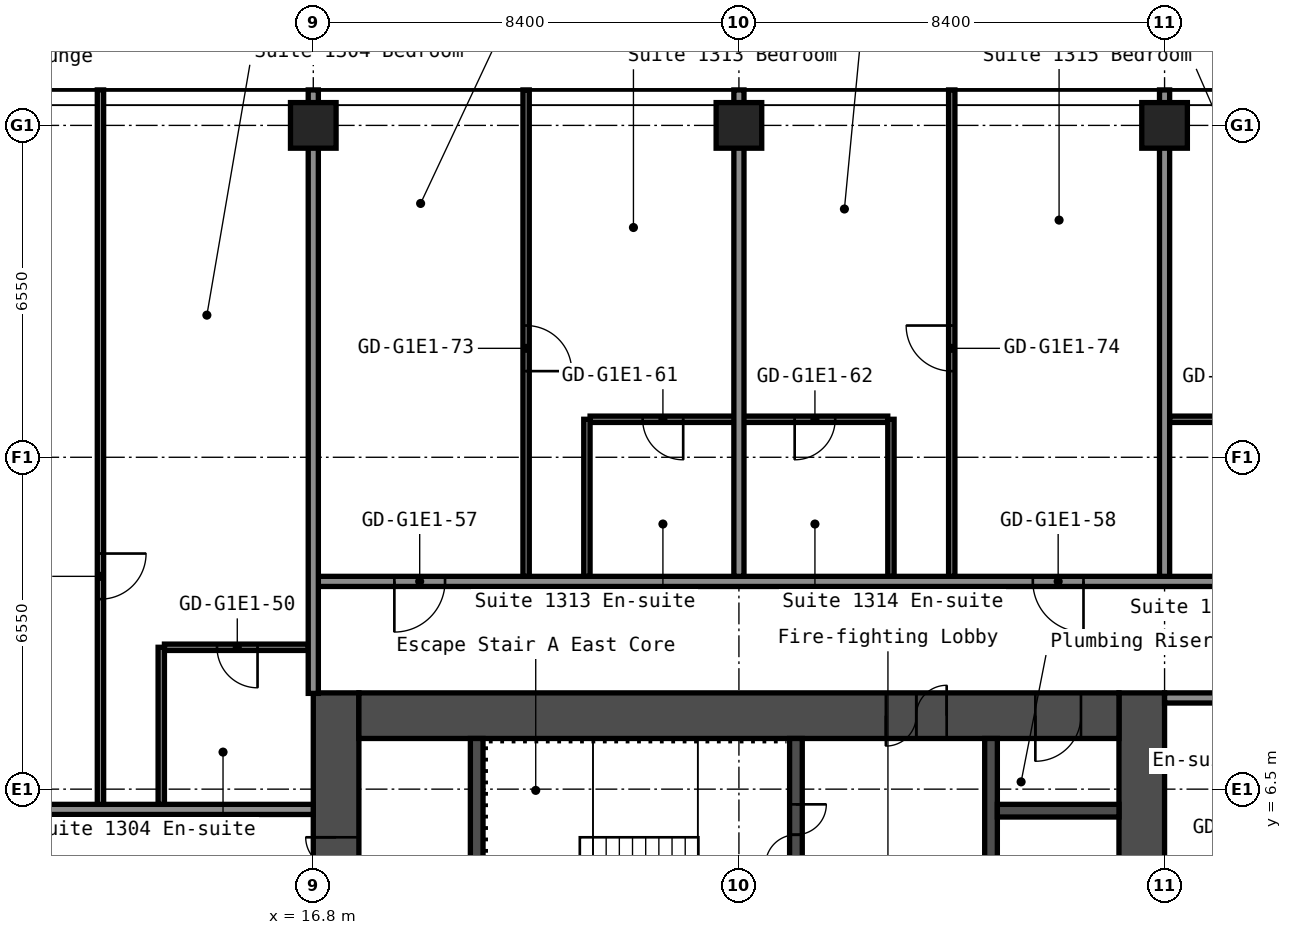
"""IFC4 building model, lengths in metres.
Left out: names, types, materials, properties, quantities, classifications, styles, units other than length and angle.
Written with IfcOpenShell. Run it as: python <this file> out.ifc"""

import sys

from ifc_helpers import new_model, si_unit, direction, frame, frame_2d, origin, origin_2d, place, context, subcontext, project, spatial, rectangle, hollow_rectangle, extrude, element, fill, save


model = new_model("IFC4")
c1 = context("Model", 3, precision=1e-05, world=origin(), true_north=direction((0.0, 1.0)))
c2 = subcontext(c1, "Body", "Model", "MODEL_VIEW")
j1 = project(units=[si_unit("LENGTHUNIT", "METRE"), si_unit("PLANEANGLEUNIT", "RADIAN")], contexts=[c1])
p1 = place(None, origin())
s1 = spatial("IfcSite", under=j1, at=p1, CompositionType="ELEMENT")
p2 = place(p1, origin())
s2 = spatial("IfcBuilding", under=s1, at=p2, CompositionType="ELEMENT")
p3 = place(p2, frame((0.0, 0.0, 48.6)))
s3 = spatial("IfcBuildingStorey", under=s2, at=p3, CompositionType="ELEMENT", Elevation=48.6)
for number, where, z_axis, x_axis in (
    (1, (16.8, 19.6, 0.0), (0.0, 0.0, 1.0), (1.0, 0.0, 0.0)),
    (2, (25.2, 19.6, 0.0), (0.0, 0.0, 1.0), (1.0, 0.0, 0.0)),
    (3, (33.6, 19.6, 0.0), (0.0, 0.0, 1.0), (1.0, 0.0, 0.0)),
):
    element("IfcColumn", number, at=place(p3, frame(where, z_axis=z_axis, x_axis=x_axis)), inside=s3, PredefinedType="COLUMN", context=c2, shape_type="SweptSolid", body=[
        extrude(hollow_rectangle(XDim=0.9, YDim=0.9, WallThickness=0.036, at=origin_2d()), origin(), (0.0, 0.0, 1.0), 2.8),
    ])
p4 = place(p3, frame((17.25, -8.4, 0.0), z_axis=(0.0, 0.0, 1.0), x_axis=(0.0, 1.0, 0.0)))
e4 = element("IfcWall", 4, at=p4, inside=s3, PredefinedType="SHEAR", context=c2, shape_type="SweptSolid", body=[
    extrude(rectangle(XDim=16.8, YDim=0.9, at=frame_2d((8.4, 0.0))), origin(), (0.0, 0.0, 1.0), 2.8),
])
p5 = place(p4, frame((12.75, 0.0, 0.0)))
e5 = element("IfcOpeningElement", 5, at=p5, cuts=e4, PredefinedType="OPENING", context=c2, shape_type="SweptSolid", body=[
    extrude(rectangle(XDim=1.2, YDim=2.1, at=frame_2d((0.6, 1.05))), frame((0.0, 0.46, 0.0), z_axis=(0.0, -1.0, 0.0), x_axis=(1.0, 0.0, 0.0)), (0.0, 0.0, 1.0), 0.92),
])
p6 = place(p4, frame((2.85, 0.0, 0.0)))
e6 = element("IfcOpeningElement", 6, at=p6, cuts=e4, PredefinedType="OPENING", context=c2, shape_type="SweptSolid", body=[
    extrude(rectangle(XDim=1.2, YDim=2.1, at=frame_2d((0.6, 1.05))), frame((0.0, 0.46, 0.0), z_axis=(0.0, -1.0, 0.0), x_axis=(1.0, 0.0, 0.0)), (0.0, 0.0, 1.0), 0.92),
])
p7 = place(p3, frame((33.15, -8.4, 0.0), z_axis=(0.0, 0.0, 1.0), x_axis=(0.0, 1.0, 0.0)))
e7 = element("IfcWall", 7, at=p7, inside=s3, PredefinedType="SHEAR", context=c2, shape_type="SweptSolid", body=[
    extrude(rectangle(XDim=16.8, YDim=0.9, at=frame_2d((8.4, 0.0))), origin(), (0.0, 0.0, 1.0), 2.8),
])
p8 = place(p3, frame((17.7, 7.95, 0.0), z_axis=(0.0, 0.0, 1.0), x_axis=(1.0, 0.0, 0.0)))
e8 = element("IfcWall", 8, at=p8, inside=s3, PredefinedType="SHEAR", context=c2, shape_type="SweptSolid", body=[
    extrude(rectangle(XDim=15.0, YDim=0.9, at=frame_2d((7.5, 0.0))), origin(), (0.0, 0.0, 1.0), 2.8),
])
p9 = place(p8, frame((10.4, 0.0, 0.0)))
e9 = element("IfcOpeningElement", 9, at=p9, cuts=e8, PredefinedType="OPENING", context=c2, shape_type="SweptSolid", body=[
    extrude(rectangle(XDim=1.2, YDim=2.1, at=frame_2d((0.6, 1.05))), frame((0.0, 0.46, 0.0), z_axis=(0.0, -1.0, 0.0), x_axis=(1.0, 0.0, 0.0)), (0.0, 0.0, 1.0), 0.92),
])
p10 = place(p8, frame((13.35, 0.0, 0.0)))
e10 = element("IfcOpeningElement", 10, at=p10, cuts=e8, PredefinedType="OPENING", context=c2, shape_type="SweptSolid", body=[
    extrude(rectangle(XDim=0.9, YDim=2.1, at=frame_2d((0.45, 1.05))), frame((0.0, 0.46, 0.0), z_axis=(0.0, -1.0, 0.0), x_axis=(1.0, 0.0, 0.0)), (0.0, 0.0, 1.0), 0.92),
])
p11 = place(p3, frame((20.025, 1.2, 0.0), z_axis=(0.0, 0.0, 1.0), x_axis=(0.0, 1.0, 0.0)))
e11 = element("IfcWall", 11, at=p11, inside=s3, PredefinedType="SHEAR", context=c2, shape_type="SweptSolid", body=[
    extrude(rectangle(XDim=6.3, YDim=0.25, at=frame_2d((3.15, 0.0))), origin(), (0.0, 0.0, 1.0), 2.8),
])
p12 = place(p3, frame((26.325, 3.75, 0.0), z_axis=(0.0, 0.0, 1.0), x_axis=(0.0, 1.0, 0.0)))
e12 = element("IfcWall", 12, at=p12, inside=s3, PredefinedType="SHEAR", context=c2, shape_type="SweptSolid", body=[
    extrude(rectangle(XDim=3.75, YDim=0.25, at=frame_2d((1.875, 0.0))), origin(), (0.0, 0.0, 1.0), 2.8),
])
p13 = place(p12, frame((1.25, 0.0, 0.0)))
e13 = element("IfcOpeningElement", 13, at=p13, cuts=e12, PredefinedType="OPENING", context=c2, shape_type="SweptSolid", body=[
    extrude(rectangle(XDim=1.2, YDim=2.1, at=frame_2d((0.6, 1.05))), frame((0.0, 0.135, 0.0), z_axis=(0.0, -1.0, 0.0), x_axis=(1.0, 0.0, 0.0)), (0.0, 0.0, 1.0), 0.27),
])
p14 = place(p3, frame((30.175, 1.45, 0.0), z_axis=(0.0, 0.0, 1.0), x_axis=(0.0, 1.0, 0.0)))
e14 = element("IfcWall", 14, at=p14, inside=s3, PredefinedType="SHEAR", context=c2, shape_type="SweptSolid", body=[
    extrude(rectangle(XDim=6.05, YDim=0.25, at=frame_2d((3.025, 0.0))), origin(), (0.0, 0.0, 1.0), 2.8),
])
p15 = place(p14, frame((2.625, 0.0, 0.0)))
e15 = element("IfcOpeningElement", 15, at=p15, cuts=e14, PredefinedType="OPENING", context=c2, shape_type="SweptSolid", body=[
    extrude(rectangle(XDim=1.1, YDim=2.1, at=frame_2d((0.55, 1.05))), frame((0.0, 0.135, 0.0), z_axis=(0.0, -1.0, 0.0), x_axis=(1.0, 0.0, 0.0)), (0.0, 0.0, 1.0), 0.27),
])
p16 = place(p3, frame((30.3, 6.075, 0.0), z_axis=(0.0, 0.0, 1.0), x_axis=(1.0, 0.0, 0.0)))
e16 = element("IfcWall", 16, at=p16, inside=s3, PredefinedType="SHEAR", context=c2, shape_type="SweptSolid", body=[
    extrude(rectangle(XDim=2.4, YDim=0.25, at=frame_2d((1.2, 0.0))), origin(), (0.0, 0.0, 1.0), 2.8),
])
p17 = place(p3, frame((-16.8, 6.1, 0.0), z_axis=(0.0, 0.0, 1.0), x_axis=(1.0, 0.0, 0.0)))
e17 = element("IfcWall", 17, at=p17, inside=s3, PredefinedType="PARTITIONING", context=c2, shape_type="SweptSolid", body=[
    extrude(rectangle(XDim=33.6, YDim=0.2, at=frame_2d((16.8, 0.0))), origin(), (0.0, 0.0, 1.0), 2.8),
])
p18 = place(p17, frame((1.6, 0.0, 0.0)))
e18 = element("IfcOpeningElement", 18, at=p18, cuts=e17, PredefinedType="OPENING", context=c2, shape_type="SweptSolid", body=[
    extrude(rectangle(XDim=1.0, YDim=2.1, at=frame_2d((0.5, 1.05))), frame((0.0, 0.11, 0.0), z_axis=(0.0, -1.0, 0.0), x_axis=(1.0, 0.0, 0.0)), (0.0, 0.0, 1.0), 0.22),
])
p19 = place(p17, frame((10.0, 0.0, 0.0)))
e19 = element("IfcOpeningElement", 19, at=p19, cuts=e17, PredefinedType="OPENING", context=c2, shape_type="SweptSolid", body=[
    extrude(rectangle(XDim=1.0, YDim=2.1, at=frame_2d((0.5, 1.05))), frame((0.0, 0.11, 0.0), z_axis=(0.0, -1.0, 0.0), x_axis=(1.0, 0.0, 0.0)), (0.0, 0.0, 1.0), 0.22),
])
p20 = place(p17, frame((18.4, 0.0, 0.0)))
e20 = element("IfcOpeningElement", 20, at=p20, cuts=e17, PredefinedType="OPENING", context=c2, shape_type="SweptSolid", body=[
    extrude(rectangle(XDim=1.0, YDim=2.1, at=frame_2d((0.5, 1.05))), frame((0.0, 0.11, 0.0), z_axis=(0.0, -1.0, 0.0), x_axis=(1.0, 0.0, 0.0)), (0.0, 0.0, 1.0), 0.22),
])
p21 = place(p17, frame((26.8, 0.0, 0.0)))
e21 = element("IfcOpeningElement", 21, at=p21, cuts=e17, PredefinedType="OPENING", context=c2, shape_type="SweptSolid", body=[
    extrude(rectangle(XDim=1.0, YDim=2.1, at=frame_2d((0.5, 1.05))), frame((0.0, 0.11, 0.0), z_axis=(0.0, -1.0, 0.0), x_axis=(1.0, 0.0, 0.0)), (0.0, 0.0, 1.0), 0.22),
])
p22 = place(p3, frame((33.6, 8.3, 0.0), z_axis=(0.0, 0.0, 1.0), x_axis=(1.0, 0.0, 0.0)))
e22 = element("IfcWall", 22, at=p22, inside=s3, PredefinedType="PARTITIONING", context=c2, shape_type="SweptSolid", body=[
    extrude(rectangle(XDim=15.0, YDim=0.2, at=frame_2d((7.5, 0.0))), origin(), (0.0, 0.0, 1.0), 2.8),
])
p23 = place(p22, frame((5.4, 0.0, 0.0)))
e23 = element("IfcOpeningElement", 23, at=p23, cuts=e22, PredefinedType="OPENING", context=c2, shape_type="SweptSolid", body=[
    extrude(rectangle(XDim=1.0, YDim=2.1, at=frame_2d((0.5, 1.05))), frame((0.0, 0.11, 0.0), z_axis=(0.0, -1.0, 0.0), x_axis=(1.0, 0.0, 0.0)), (0.0, 0.0, 1.0), 0.22),
])
p24 = place(p22, frame((12.9, 0.0, 0.0)))
e24 = element("IfcOpeningElement", 24, at=p24, cuts=e22, PredefinedType="OPENING", context=c2, shape_type="SweptSolid", body=[
    extrude(rectangle(XDim=1.0, YDim=2.1, at=frame_2d((0.5, 1.05))), frame((0.0, 0.11, 0.0), z_axis=(0.0, -1.0, 0.0), x_axis=(1.0, 0.0, 0.0)), (0.0, 0.0, 1.0), 0.22),
])
p25 = place(p3, frame((13.863, 9.3, 0.0), z_axis=(0.0, 0.0, 1.0), x_axis=(1.0, 0.0, 0.0)))
e25 = element("IfcWall", 25, at=p25, inside=s3, PredefinedType="PARTITIONING", context=c2, shape_type="SweptSolid", body=[
    extrude(rectangle(XDim=2.837, YDim=0.125, at=frame_2d((1.419, 0.0))), origin(), (0.0, 0.0, 1.0), 2.8),
])
p26 = place(p25, frame((1.038, 0.0, 0.0)))
e26 = element("IfcOpeningElement", 26, at=p26, cuts=e25, PredefinedType="OPENING", context=c2, shape_type="SweptSolid", body=[
    extrude(rectangle(XDim=0.8, YDim=2.1, at=frame_2d((0.4, 1.05))), frame((0.0, 0.073, 0.0), z_axis=(0.0, -1.0, 0.0), x_axis=(1.0, 0.0, 0.0)), (0.0, 0.0, 1.0), 0.145),
])
p27 = place(p3, frame((16.8, 10.6, 0.0), z_axis=(0.0, 0.0, 1.0), x_axis=(1.0, 0.0, 0.0)))
e27 = element("IfcWall", 27, at=p27, inside=s3, PredefinedType="PARTITIONING", context=c2, shape_type="SweptSolid", body=[
    extrude(rectangle(XDim=34.3, YDim=0.2, at=frame_2d((17.15, 0.0))), origin(), (0.0, 0.0, 1.0), 2.8),
])
p28 = place(p27, frame((1.6, 0.0, 0.0)))
e28 = element("IfcOpeningElement", 28, at=p28, cuts=e27, PredefinedType="OPENING", context=c2, shape_type="SweptSolid", body=[
    extrude(rectangle(XDim=1.0, YDim=2.1, at=frame_2d((0.5, 1.05))), frame((0.0, 0.11, 0.0), z_axis=(0.0, -1.0, 0.0), x_axis=(1.0, 0.0, 0.0)), (0.0, 0.0, 1.0), 0.22),
])
p29 = place(p27, frame((14.2, 0.0, 0.0)))
e29 = element("IfcOpeningElement", 29, at=p29, cuts=e27, PredefinedType="OPENING", context=c2, shape_type="SweptSolid", body=[
    extrude(rectangle(XDim=1.0, YDim=2.1, at=frame_2d((0.5, 1.05))), frame((0.0, 0.11, 0.0), z_axis=(0.0, -1.0, 0.0), x_axis=(1.0, 0.0, 0.0)), (0.0, 0.0, 1.0), 0.22),
])
p30 = place(p27, frame((22.6, 0.0, 0.0)))
e30 = element("IfcOpeningElement", 30, at=p30, cuts=e27, PredefinedType="OPENING", context=c2, shape_type="SweptSolid", body=[
    extrude(rectangle(XDim=1.0, YDim=2.1, at=frame_2d((0.5, 1.05))), frame((0.0, 0.11, 0.0), z_axis=(0.0, -1.0, 0.0), x_axis=(1.0, 0.0, 0.0)), (0.0, 0.0, 1.0), 0.22),
])
p31 = place(p27, frame((26.9, 0.0, 0.0)))
e31 = element("IfcOpeningElement", 31, at=p31, cuts=e27, PredefinedType="OPENING", context=c2, shape_type="SweptSolid", body=[
    extrude(rectangle(XDim=1.0, YDim=2.1, at=frame_2d((0.5, 1.05))), frame((0.0, 0.11, 0.0), z_axis=(0.0, -1.0, 0.0), x_axis=(1.0, 0.0, 0.0)), (0.0, 0.0, 1.0), 0.22),
])
p32 = place(p3, frame((22.262, 13.8, 0.0), z_axis=(0.0, 0.0, 1.0), x_axis=(1.0, 0.0, 0.0)))
e32 = element("IfcWall", 32, at=p32, inside=s3, PredefinedType="PARTITIONING", context=c2, shape_type="SweptSolid", body=[
    extrude(rectangle(XDim=5.875, YDim=0.125, at=frame_2d((2.938, 0.0))), origin(), (0.0, 0.0, 1.0), 2.8),
])
p33 = place(p32, frame((1.038, 0.0, 0.0)))
e33 = element("IfcOpeningElement", 33, at=p33, cuts=e32, PredefinedType="OPENING", context=c2, shape_type="SweptSolid", body=[
    extrude(rectangle(XDim=0.8, YDim=2.1, at=frame_2d((0.4, 1.05))), frame((0.0, 0.073, 0.0), z_axis=(0.0, -1.0, 0.0), x_axis=(1.0, 0.0, 0.0)), (0.0, 0.0, 1.0), 0.145),
])
p34 = place(p32, frame((4.038, 0.0, 0.0)))
e34 = element("IfcOpeningElement", 34, at=p34, cuts=e32, PredefinedType="OPENING", context=c2, shape_type="SweptSolid", body=[
    extrude(rectangle(XDim=0.8, YDim=2.1, at=frame_2d((0.4, 1.05))), frame((0.0, 0.073, 0.0), z_axis=(0.0, -1.0, 0.0), x_axis=(1.0, 0.0, 0.0)), (0.0, 0.0, 1.0), 0.145),
])
p35 = place(p3, frame((33.7, 13.8, 0.0), z_axis=(0.0, 0.0, 1.0), x_axis=(1.0, 0.0, 0.0)))
e35 = element("IfcWall", 35, at=p35, inside=s3, PredefinedType="PARTITIONING", context=c2, shape_type="SweptSolid", body=[
    extrude(rectangle(XDim=2.838, YDim=0.125, at=frame_2d((1.419, 0.0))), origin(), (0.0, 0.0, 1.0), 2.8),
])
p36 = place(p35, frame((1.0, 0.0, 0.0)))
e36 = element("IfcOpeningElement", 36, at=p36, cuts=e35, PredefinedType="OPENING", context=c2, shape_type="SweptSolid", body=[
    extrude(rectangle(XDim=0.8, YDim=2.1, at=frame_2d((0.4, 1.05))), frame((0.0, 0.073, 0.0), z_axis=(0.0, -1.0, 0.0), x_axis=(1.0, 0.0, 0.0)), (0.0, 0.0, 1.0), 0.145),
])
p37 = place(p3, frame((12.6, 6.2, 0.0), z_axis=(0.0, 0.0, 1.0), x_axis=(0.0, 1.0, 0.0)))
e37 = element("IfcWall", 37, at=p37, inside=s3, PredefinedType="PARTITIONING", context=c2, shape_type="SweptSolid", body=[
    extrude(rectangle(XDim=14.1, YDim=0.125, at=frame_2d((7.05, 0.0))), origin(), (0.0, 0.0, 1.0), 2.8),
])
p38 = place(p37, frame((4.05, 0.0, 0.0)))
e38 = element("IfcOpeningElement", 38, at=p38, cuts=e37, PredefinedType="OPENING", context=c2, shape_type="SweptSolid", body=[
    extrude(rectangle(XDim=0.9, YDim=2.1, at=frame_2d((0.45, 1.05))), frame((0.0, 0.073, 0.0), z_axis=(0.0, -1.0, 0.0), x_axis=(1.0, 0.0, 0.0)), (0.0, 0.0, 1.0), 0.145),
])
p39 = place(p3, frame((13.8, 6.2, 0.0), z_axis=(0.0, 0.0, 1.0), x_axis=(0.0, 1.0, 0.0)))
e39 = element("IfcWall", 39, at=p39, inside=s3, PredefinedType="PARTITIONING", context=c2, shape_type="SweptSolid", body=[
    extrude(rectangle(XDim=3.1, YDim=0.125, at=frame_2d((1.55, 0.0))), origin(), (0.0, 0.0, 1.0), 2.8),
])
p40 = place(p3, frame((16.8, 8.39, 0.0), z_axis=(0.0, 0.0, 1.0), x_axis=(0.0, 1.0, 0.0)))
e40 = element("IfcWall", 40, at=p40, inside=s3, PredefinedType="PARTITIONING", context=c2, shape_type="SweptSolid", body=[
    extrude(rectangle(XDim=11.91, YDim=0.2, at=frame_2d((5.955, 0.0))), origin(), (0.0, 0.0, 1.0), 2.8),
])
p41 = place(p3, frame((21.0, 10.7, 0.0), z_axis=(0.0, 0.0, 1.0), x_axis=(0.0, 1.0, 0.0)))
e41 = element("IfcWall", 41, at=p41, inside=s3, PredefinedType="PARTITIONING", context=c2, shape_type="SweptSolid", body=[
    extrude(rectangle(XDim=9.6, YDim=0.125, at=frame_2d((4.8, 0.0))), origin(), (0.0, 0.0, 1.0), 2.8),
])
p42 = place(p41, frame((4.05, 0.0, 0.0)))
e42 = element("IfcOpeningElement", 42, at=p42, cuts=e41, PredefinedType="OPENING", context=c2, shape_type="SweptSolid", body=[
    extrude(rectangle(XDim=0.9, YDim=2.1, at=frame_2d((0.45, 1.05))), frame((0.0, 0.073, 0.0), z_axis=(0.0, -1.0, 0.0), x_axis=(1.0, 0.0, 0.0)), (0.0, 0.0, 1.0), 0.145),
])
p43 = place(p3, frame((22.2, 10.7, 0.0), z_axis=(0.0, 0.0, 1.0), x_axis=(0.0, 1.0, 0.0)))
e43 = element("IfcWall", 43, at=p43, inside=s3, PredefinedType="PARTITIONING", context=c2, shape_type="SweptSolid", body=[
    extrude(rectangle(XDim=3.1, YDim=0.125, at=frame_2d((1.55, 0.0))), origin(), (0.0, 0.0, 1.0), 2.8),
])
p44 = place(p3, frame((25.2, 10.7, 0.0), z_axis=(0.0, 0.0, 1.0), x_axis=(0.0, 1.0, 0.0)))
e44 = element("IfcWall", 44, at=p44, inside=s3, PredefinedType="PARTITIONING", context=c2, shape_type="SweptSolid", body=[
    extrude(rectangle(XDim=9.6, YDim=0.2, at=frame_2d((4.8, 0.0))), origin(), (0.0, 0.0, 1.0), 2.8),
])
p45 = place(p3, frame((28.2, 10.7, 0.0), z_axis=(0.0, 0.0, 1.0), x_axis=(0.0, 1.0, 0.0)))
e45 = element("IfcWall", 45, at=p45, inside=s3, PredefinedType="PARTITIONING", context=c2, shape_type="SweptSolid", body=[
    extrude(rectangle(XDim=3.1, YDim=0.125, at=frame_2d((1.55, 0.0))), origin(), (0.0, 0.0, 1.0), 2.8),
])
p46 = place(p3, frame((29.4, 10.7, 0.0), z_axis=(0.0, 0.0, 1.0), x_axis=(0.0, 1.0, 0.0)))
e46 = element("IfcWall", 46, at=p46, inside=s3, PredefinedType="PARTITIONING", context=c2, shape_type="SweptSolid", body=[
    extrude(rectangle(XDim=9.6, YDim=0.125, at=frame_2d((4.8, 0.0))), origin(), (0.0, 0.0, 1.0), 2.8),
])
p47 = place(p46, frame((4.05, 0.0, 0.0)))
e47 = element("IfcOpeningElement", 47, at=p47, cuts=e46, PredefinedType="OPENING", context=c2, shape_type="SweptSolid", body=[
    extrude(rectangle(XDim=0.9, YDim=2.1, at=frame_2d((0.45, 1.05))), frame((0.0, 0.073, 0.0), z_axis=(0.0, -1.0, 0.0), x_axis=(1.0, 0.0, 0.0)), (0.0, 0.0, 1.0), 0.145),
])
p48 = place(p3, frame((33.6, 10.7, 0.0), z_axis=(0.0, 0.0, 1.0), x_axis=(0.0, 1.0, 0.0)))
e48 = element("IfcWall", 48, at=p48, inside=s3, PredefinedType="PARTITIONING", context=c2, shape_type="SweptSolid", body=[
    extrude(rectangle(XDim=9.6, YDim=0.2, at=frame_2d((4.8, 0.0))), origin(), (0.0, 0.0, 1.0), 2.8),
])
p49 = place(p5, origin())
e49 = element("IfcDoor", 49, at=p49, inside=s3, OperationType="DOUBLE_DOOR_SINGLE_SWING", PredefinedType="DOOR", context=c2, shape_type="SweptSolid", body=[
    extrude(rectangle(XDim=1.2, YDim=2.1, at=frame_2d((0.6, 1.05))), frame((0.0, 0.025, 0.0), z_axis=(0.0, -1.0, 0.0), x_axis=(1.0, 0.0, 0.0)), (0.0, 0.0, 1.0), 0.05),
])
fill(e5, e49)
p50 = place(p9, origin())
e50 = element("IfcDoor", 50, at=p50, inside=s3, OperationType="DOUBLE_DOOR_SINGLE_SWING", PredefinedType="DOOR", context=c2, shape_type="SweptSolid", body=[
    extrude(rectangle(XDim=1.2, YDim=2.1, at=frame_2d((0.6, 1.05))), frame((0.0, 0.025, 0.0), z_axis=(0.0, -1.0, 0.0), x_axis=(1.0, 0.0, 0.0)), (0.0, 0.0, 1.0), 0.05),
])
fill(e9, e50)
p51 = place(p10, origin())
e51 = element("IfcDoor", 51, at=p51, inside=s3, OperationType="SINGLE_SWING_LEFT", PredefinedType="DOOR", context=c2, shape_type="SweptSolid", body=[
    extrude(rectangle(XDim=0.9, YDim=2.1, at=frame_2d((0.45, 1.05))), frame((0.0, 0.025, 0.0), z_axis=(0.0, -1.0, 0.0), x_axis=(1.0, 0.0, 0.0)), (0.0, 0.0, 1.0), 0.05),
])
fill(e10, e51)
p52 = place(p13, origin())
e52 = element("IfcDoor", 52, at=p52, inside=s3, OperationType="DOUBLE_DOOR_SINGLE_SWING", PredefinedType="DOOR", context=c2, shape_type="SweptSolid", body=[
    extrude(rectangle(XDim=1.2, YDim=2.1, at=frame_2d((0.6, 1.05))), frame((0.0, 0.025, 0.0), z_axis=(0.0, -1.0, 0.0), x_axis=(1.0, 0.0, 0.0)), (0.0, 0.0, 1.0), 0.05),
])
fill(e13, e52)
p53 = place(p26, origin())
e53 = element("IfcDoor", 53, at=p53, inside=s3, OperationType="SINGLE_SWING_RIGHT", PredefinedType="DOOR", context=c2, shape_type="SweptSolid", body=[
    extrude(rectangle(XDim=0.8, YDim=2.1, at=frame_2d((0.4, 1.05))), frame((0.0, 0.025, 0.0), z_axis=(0.0, -1.0, 0.0), x_axis=(1.0, 0.0, 0.0)), (0.0, 0.0, 1.0), 0.05),
])
fill(e26, e53)
p54 = place(p28, origin())
e54 = element("IfcDoor", 54, at=p54, inside=s3, OperationType="SINGLE_SWING_LEFT", PredefinedType="DOOR", context=c2, shape_type="SweptSolid", body=[
    extrude(rectangle(XDim=1.0, YDim=2.1, at=frame_2d((0.5, 1.05))), frame((0.0, 0.025, 0.0), z_axis=(0.0, -1.0, 0.0), x_axis=(1.0, 0.0, 0.0)), (0.0, 0.0, 1.0), 0.05),
])
fill(e28, e54)
p55 = place(p29, origin())
e55 = element("IfcDoor", 55, at=p55, inside=s3, OperationType="SINGLE_SWING_RIGHT", PredefinedType="DOOR", context=c2, shape_type="SweptSolid", body=[
    extrude(rectangle(XDim=1.0, YDim=2.1, at=frame_2d((0.5, 1.05))), frame((0.0, 0.025, 0.0), z_axis=(0.0, -1.0, 0.0), x_axis=(1.0, 0.0, 0.0)), (0.0, 0.0, 1.0), 0.05),
])
fill(e29, e55)
p56 = place(p33, origin())
e56 = element("IfcDoor", 56, at=p56, inside=s3, OperationType="SINGLE_SWING_RIGHT", PredefinedType="DOOR", context=c2, shape_type="SweptSolid", body=[
    extrude(rectangle(XDim=0.8, YDim=2.1, at=frame_2d((0.4, 1.05))), frame((0.0, 0.025, 0.0), z_axis=(0.0, -1.0, 0.0), x_axis=(1.0, 0.0, 0.0)), (0.0, 0.0, 1.0), 0.05),
])
fill(e33, e56)
p57 = place(p34, origin())
e57 = element("IfcDoor", 57, at=p57, inside=s3, OperationType="SINGLE_SWING_LEFT", PredefinedType="DOOR", context=c2, shape_type="SweptSolid", body=[
    extrude(rectangle(XDim=0.8, YDim=2.1, at=frame_2d((0.4, 1.05))), frame((0.0, 0.025, 0.0), z_axis=(0.0, -1.0, 0.0), x_axis=(1.0, 0.0, 0.0)), (0.0, 0.0, 1.0), 0.05),
])
fill(e34, e57)
p58 = place(p38, origin())
e58 = element("IfcDoor", 58, at=p58, inside=s3, OperationType="SINGLE_SWING_RIGHT", PredefinedType="DOOR", context=c2, shape_type="SweptSolid", body=[
    extrude(rectangle(XDim=0.9, YDim=2.1, at=frame_2d((0.45, 1.05))), frame((0.0, 0.025, 0.0), z_axis=(0.0, -1.0, 0.0), x_axis=(1.0, 0.0, 0.0)), (0.0, 0.0, 1.0), 0.05),
])
fill(e38, e58)
p59 = place(p42, origin())
e59 = element("IfcDoor", 59, at=p59, inside=s3, OperationType="SINGLE_SWING_LEFT", PredefinedType="DOOR", context=c2, shape_type="SweptSolid", body=[
    extrude(rectangle(XDim=0.9, YDim=2.1, at=frame_2d((0.45, 1.05))), frame((0.0, 0.025, 0.0), z_axis=(0.0, -1.0, 0.0), x_axis=(1.0, 0.0, 0.0)), (0.0, 0.0, 1.0), 0.05),
])
fill(e42, e59)
p60 = place(p47, origin())
e60 = element("IfcDoor", 60, at=p60, inside=s3, OperationType="SINGLE_SWING_LEFT", PredefinedType="DOOR", context=c2, shape_type="SweptSolid", body=[
    extrude(rectangle(XDim=0.9, YDim=2.1, at=frame_2d((0.45, 1.05))), frame((0.0, 0.025, 0.0), z_axis=(0.0, -1.0, 0.0), x_axis=(1.0, 0.0, 0.0)), (0.0, 0.0, 1.0), 0.05),
])
fill(e47, e60)
save(model, sys.argv[1])
